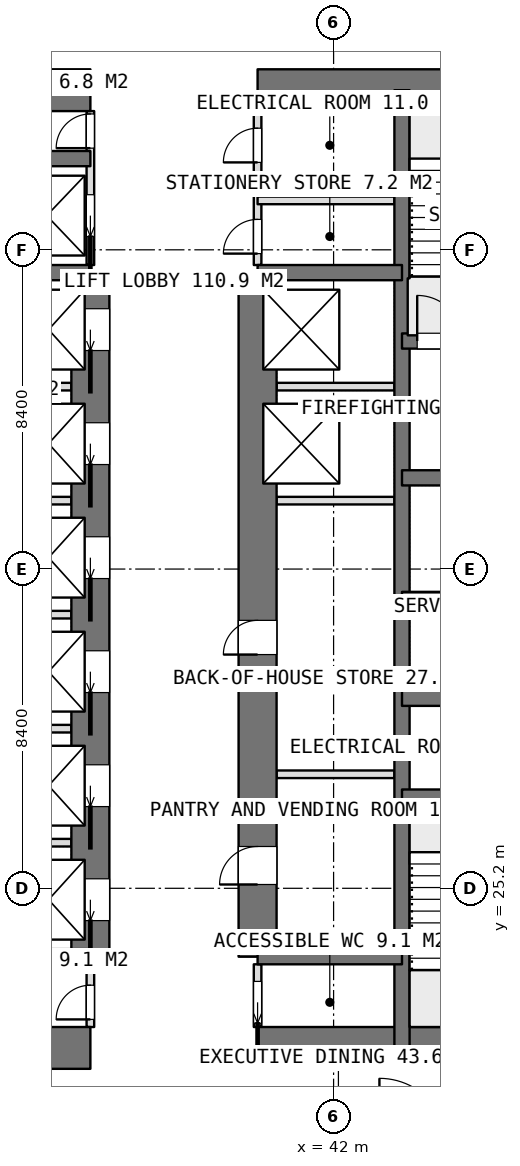
"""IFC4 building model, lengths in metres.
Left out: names, types, materials, properties, quantities, classifications, styles, units other than length and angle.
Written with IfcOpenShell. Run it as: python <this file> out.ifc"""

import sys

from ifc_helpers import new_model, si_unit, direction, frame, frame_2d, origin, place, context, subcontext, project, spatial, rectangle, extrude, element, fill, save


model = new_model("IFC4")
c1 = context("Model", 3, precision=1e-05, world=origin(), true_north=direction((0.0, 1.0)))
c2 = subcontext(c1, "Body", "Model", "MODEL_VIEW")
j1 = project(units=[si_unit("LENGTHUNIT", "METRE"), si_unit("PLANEANGLEUNIT", "RADIAN")], contexts=[c1])
p1 = place(None, origin())
s1 = spatial("IfcSite", under=j1, at=p1, CompositionType="ELEMENT")
p2 = place(p1, origin())
s2 = spatial("IfcBuilding", under=s1, at=p2, CompositionType="ELEMENT")
p3 = place(p2, frame((0.0, 0.0, 250.1)))
s3 = spatial("IfcBuildingStorey", under=s2, at=p3, CompositionType="ELEMENT", Elevation=250.1)
p4 = place(p3, frame((25.2, 21.0, 0.0), z_axis=(0.0, 0.0, 1.0), x_axis=(1.0, 0.0, 0.0)))
e1 = element("IfcWall", 1, at=p4, inside=s3, PredefinedType="SHEAR", context=c2, shape_type="SweptSolid", body=[
    extrude(rectangle(XDim=10.4, YDim=1.1, at=frame_2d((5.2, 0.0))), origin(), (0.0, 0.0, 1.0), 3.75),
])
p5 = place(p3, frame((40.0, 21.0, 0.0), z_axis=(0.0, 0.0, 1.0), x_axis=(1.0, 0.0, 0.0)))
e2 = element("IfcWall", 2, at=p5, inside=s3, PredefinedType="SHEAR", context=c2, shape_type="SweptSolid", body=[
    extrude(rectangle(XDim=10.4, YDim=1.1, at=frame_2d((5.2, 0.0))), origin(), (0.0, 0.0, 1.0), 3.75),
])
p6 = place(p3, frame((25.2, 46.2, 0.0), z_axis=(0.0, 0.0, 1.0), x_axis=(1.0, 0.0, 0.0)))
e3 = element("IfcWall", 3, at=p6, inside=s3, PredefinedType="SHEAR", context=c2, shape_type="SweptSolid", body=[
    extrude(rectangle(XDim=10.4, YDim=1.1, at=frame_2d((5.2, 0.0))), origin(), (0.0, 0.0, 1.0), 3.75),
])
p7 = place(p3, frame((40.0, 46.2, 0.0), z_axis=(0.0, 0.0, 1.0), x_axis=(1.0, 0.0, 0.0)))
e4 = element("IfcWall", 4, at=p7, inside=s3, PredefinedType="SHEAR", context=c2, shape_type="SweptSolid", body=[
    extrude(rectangle(XDim=10.4, YDim=1.1, at=frame_2d((5.2, 0.0))), origin(), (0.0, 0.0, 1.0), 3.75),
])
p8 = place(p3, frame((43.8, 21.0, 0.0), z_axis=(0.0, 0.0, 1.0), x_axis=(0.0, 1.0, 0.0)))
e5 = element("IfcWall", 5, at=p8, inside=s3, PredefinedType="SHEAR", context=c2, shape_type="SweptSolid", body=[
    extrude(rectangle(XDim=25.2, YDim=0.4, at=frame_2d((12.6, 0.0))), origin(), (0.0, 0.0, 1.0), 3.75),
])
p9 = place(p3, frame((35.6, 23.4, 0.0), z_axis=(0.0, 0.0, 1.0), x_axis=(0.0, 1.0, 0.0)))
e6 = element("IfcWall", 6, at=p9, inside=s3, PredefinedType="SHEAR", context=c2, shape_type="SweptSolid", body=[
    extrude(rectangle(XDim=18.0, YDim=1.0, at=frame_2d((9.0, 0.0))), origin(), (0.0, 0.0, 1.0), 3.75),
])
p10 = place(p9, frame((0.95, 0.0, 0.0)))
e7 = element("IfcOpeningElement", 7, at=p10, cuts=e6, PredefinedType="OPENING", context=c2, shape_type="SweptSolid", body=[
    extrude(rectangle(XDim=1.1, YDim=2.1, at=frame_2d((0.55, 1.05))), frame((0.0, 0.51, 0.0), z_axis=(0.0, -1.0, 0.0), x_axis=(1.0, 0.0, 0.0)), (0.0, 0.0, 1.0), 1.02),
])
p11 = place(p9, frame((3.95, 0.0, 0.0)))
e8 = element("IfcOpeningElement", 8, at=p11, cuts=e6, PredefinedType="OPENING", context=c2, shape_type="SweptSolid", body=[
    extrude(rectangle(XDim=1.1, YDim=2.1, at=frame_2d((0.55, 1.05))), frame((0.0, 0.51, 0.0), z_axis=(0.0, -1.0, 0.0), x_axis=(1.0, 0.0, 0.0)), (0.0, 0.0, 1.0), 1.02),
])
p12 = place(p9, frame((6.95, 0.0, 0.0)))
e9 = element("IfcOpeningElement", 9, at=p12, cuts=e6, PredefinedType="OPENING", context=c2, shape_type="SweptSolid", body=[
    extrude(rectangle(XDim=1.1, YDim=2.1, at=frame_2d((0.55, 1.05))), frame((0.0, 0.51, 0.0), z_axis=(0.0, -1.0, 0.0), x_axis=(1.0, 0.0, 0.0)), (0.0, 0.0, 1.0), 1.02),
])
p13 = place(p9, frame((9.95, 0.0, 0.0)))
e10 = element("IfcOpeningElement", 10, at=p13, cuts=e6, PredefinedType="OPENING", context=c2, shape_type="SweptSolid", body=[
    extrude(rectangle(XDim=1.1, YDim=2.1, at=frame_2d((0.55, 1.05))), frame((0.0, 0.51, 0.0), z_axis=(0.0, -1.0, 0.0), x_axis=(1.0, 0.0, 0.0)), (0.0, 0.0, 1.0), 1.02),
])
p14 = place(p9, frame((12.95, 0.0, 0.0)))
e11 = element("IfcOpeningElement", 11, at=p14, cuts=e6, PredefinedType="OPENING", context=c2, shape_type="SweptSolid", body=[
    extrude(rectangle(XDim=1.1, YDim=2.1, at=frame_2d((0.55, 1.05))), frame((0.0, 0.51, 0.0), z_axis=(0.0, -1.0, 0.0), x_axis=(1.0, 0.0, 0.0)), (0.0, 0.0, 1.0), 1.02),
])
p15 = place(p9, frame((15.95, 0.0, 0.0)))
e12 = element("IfcOpeningElement", 12, at=p15, cuts=e6, PredefinedType="OPENING", context=c2, shape_type="SweptSolid", body=[
    extrude(rectangle(XDim=1.1, YDim=2.1, at=frame_2d((0.55, 1.05))), frame((0.0, 0.51, 0.0), z_axis=(0.0, -1.0, 0.0), x_axis=(1.0, 0.0, 0.0)), (0.0, 0.0, 1.0), 1.02),
])
p16 = place(p3, frame((40.0, 23.4, 0.0), z_axis=(0.0, 0.0, 1.0), x_axis=(0.0, 1.0, 0.0)))
e13 = element("IfcWall", 13, at=p16, inside=s3, PredefinedType="SHEAR", context=c2, shape_type="SweptSolid", body=[
    extrude(rectangle(XDim=18.0, YDim=1.0, at=frame_2d((9.0, 0.0))), origin(), (0.0, 0.0, 1.0), 3.75),
])
p17 = place(p16, frame((1.9, 0.0, 0.0)))
e14 = element("IfcOpeningElement", 14, at=p17, cuts=e13, PredefinedType="OPENING", context=c2, shape_type="SweptSolid", body=[
    extrude(rectangle(XDim=1.0, YDim=2.1, at=frame_2d((0.5, 1.05))), frame((0.0, 0.51, 0.0), z_axis=(0.0, -1.0, 0.0), x_axis=(1.0, 0.0, 0.0)), (0.0, 0.0, 1.0), 1.02),
])
p18 = place(p16, frame((7.95, 0.0, 0.0)))
e15 = element("IfcOpeningElement", 15, at=p18, cuts=e13, PredefinedType="OPENING", context=c2, shape_type="SweptSolid", body=[
    extrude(rectangle(XDim=0.9, YDim=2.1, at=frame_2d((0.45, 1.05))), frame((0.0, 0.51, 0.0), z_axis=(0.0, -1.0, 0.0), x_axis=(1.0, 0.0, 0.0)), (0.0, 0.0, 1.0), 1.02),
])
for number, where, z_axis, x_axis in (
    (16, (31.8, 23.4, 0.0), (0.0, 0.0, 1.0), (1.0, 0.0, 0.0)),
    (17, (31.8, 41.4, 0.0), (0.0, 0.0, 1.0), (1.0, 0.0, 0.0)),
    (18, (31.8, 44.4, 0.0), (0.0, 0.0, 1.0), (1.0, 0.0, 0.0)),
    (19, (40.0, 23.4, 0.0), (0.0, 0.0, 1.0), (1.0, 0.0, 0.0)),
    (20, (40.0, 41.4, 0.0), (0.0, 0.0, 1.0), (1.0, 0.0, 0.0)),
):
    element("IfcWall", number, at=place(p3, frame(where, z_axis=z_axis, x_axis=x_axis)), inside=s3, PredefinedType="SHEAR", context=c2, shape_type="SweptSolid", body=[
        extrude(rectangle(XDim=3.8, YDim=0.4, at=frame_2d((1.9, 0.0))), origin(), (0.0, 0.0, 1.0), 3.75),
    ])
for number, where, z_axis, x_axis in (
    (21, (43.8, 27.6, 0.0), (0.0, 0.0, 1.0), (1.0, 0.0, 0.0)),
    (22, (43.8, 30.2, 0.0), (0.0, 0.0, 1.0), (1.0, 0.0, 0.0)),
    (23, (43.8, 32.8, 0.0), (0.0, 0.0, 1.0), (1.0, 0.0, 0.0)),
):
    element("IfcWall", number, at=place(p3, frame(where, z_axis=z_axis, x_axis=x_axis)), inside=s3, PredefinedType="SHEAR", context=c2, shape_type="SweptSolid", body=[
        extrude(rectangle(XDim=6.6, YDim=0.4, at=frame_2d((3.3, 0.0))), origin(), (0.0, 0.0, 1.0), 3.75),
    ])
p19 = place(p3, frame((43.8, 36.0, 0.0), z_axis=(0.0, 0.0, 1.0), x_axis=(1.0, 0.0, 0.0)))
e24 = element("IfcWall", 24, at=p19, inside=s3, PredefinedType="SHEAR", context=c2, shape_type="SweptSolid", body=[
    extrude(rectangle(XDim=6.6, YDim=0.4, at=frame_2d((3.3, 0.0))), origin(), (0.0, 0.0, 1.0), 3.75),
])
p20 = place(p19, frame((2.65, 0.0, 0.0)))
e25 = element("IfcOpeningElement", 25, at=p20, cuts=e24, PredefinedType="OPENING", context=c2, shape_type="SweptSolid", body=[
    extrude(rectangle(XDim=1.3, YDim=2.1, at=frame_2d((0.65, 1.05))), frame((0.0, 0.21, 0.0), z_axis=(0.0, -1.0, 0.0), x_axis=(1.0, 0.0, 0.0)), (0.0, 0.0, 1.0), 0.42),
])
p21 = place(p3, frame((43.8, 39.6, 0.0), z_axis=(0.0, 0.0, 1.0), x_axis=(1.0, 0.0, 0.0)))
e26 = element("IfcWall", 26, at=p21, inside=s3, PredefinedType="SHEAR", context=c2, shape_type="SweptSolid", body=[
    extrude(rectangle(XDim=6.6, YDim=0.4, at=frame_2d((3.3, 0.0))), origin(), (0.0, 0.0, 1.0), 3.75),
])
p22 = place(p21, frame((0.4, 0.0, 0.0)))
e27 = element("IfcOpeningElement", 27, at=p22, cuts=e26, PredefinedType="OPENING", context=c2, shape_type="SweptSolid", body=[
    extrude(rectangle(XDim=1.2, YDim=2.1, at=frame_2d((0.6, 1.05))), frame((0.0, 0.21, 0.0), z_axis=(0.0, -1.0, 0.0), x_axis=(1.0, 0.0, 0.0)), (0.0, 0.0, 1.0), 0.42),
])
for number, where, z_axis, x_axis in (
    (28, (32.0, 26.4, 0.0), (0.0, 0.0, 1.0), (1.0, 0.0, 0.0)),
    (29, (32.0, 29.4, 0.0), (0.0, 0.0, 1.0), (1.0, 0.0, 0.0)),
    (30, (32.0, 32.4, 0.0), (0.0, 0.0, 1.0), (1.0, 0.0, 0.0)),
    (31, (32.0, 35.4, 0.0), (0.0, 0.0, 1.0), (1.0, 0.0, 0.0)),
    (32, (32.0, 38.4, 0.0), (0.0, 0.0, 1.0), (1.0, 0.0, 0.0)),
    (33, (40.5, 35.4, 0.0), (0.0, 0.0, 1.0), (1.0, 0.0, 0.0)),
    (34, (40.5, 38.4, 0.0), (0.0, 0.0, 1.0), (1.0, 0.0, 0.0)),
):
    element("IfcWall", number, at=place(p3, frame(where, z_axis=z_axis, x_axis=x_axis)), inside=s3, PredefinedType="PARTITIONING", context=c2, shape_type="SweptSolid", body=[
        extrude(rectangle(XDim=3.1, YDim=0.2, at=frame_2d((1.55, 0.0))), origin(), (0.0, 0.0, 1.0), 3.5),
    ])
p23 = place(p3, frame((40.0, 21.55, 0.0), z_axis=(0.0, 0.0, 1.0), x_axis=(0.0, 1.0, 0.0)))
e35 = element("IfcWall", 35, at=p23, inside=s3, PredefinedType="PARTITIONING", context=c2, shape_type="SweptSolid", body=[
    extrude(rectangle(XDim=1.65, YDim=0.2, at=frame_2d((0.825, 0.0))), origin(), (0.0, 0.0, 1.0), 3.5),
])
p24 = place(p23, frame((0.1, 0.0, 0.0)))
e36 = element("IfcOpeningElement", 36, at=p24, cuts=e35, PredefinedType="OPENING", context=c2, shape_type="SweptSolid", body=[
    extrude(rectangle(XDim=1.1, YDim=2.1, at=frame_2d((0.55, 1.05))), frame((0.0, 0.11, 0.0), z_axis=(0.0, -1.0, 0.0), x_axis=(1.0, 0.0, 0.0)), (0.0, 0.0, 1.0), 0.22),
])
p25 = place(p3, frame((40.0, 41.6, 0.0), z_axis=(0.0, 0.0, 1.0), x_axis=(0.0, 1.0, 0.0)))
e37 = element("IfcWall", 37, at=p25, inside=s3, PredefinedType="PARTITIONING", context=c2, shape_type="SweptSolid", body=[
    extrude(rectangle(XDim=4.05, YDim=0.2, at=frame_2d((2.025, 0.0))), origin(), (0.0, 0.0, 1.0), 3.5),
])
p26 = place(p25, frame((2.7, 0.0, 0.0)))
e38 = element("IfcOpeningElement", 38, at=p26, cuts=e37, PredefinedType="OPENING", context=c2, shape_type="SweptSolid", body=[
    extrude(rectangle(XDim=0.9, YDim=2.1, at=frame_2d((0.45, 1.05))), frame((0.0, 0.11, 0.0), z_axis=(0.0, -1.0, 0.0), x_axis=(1.0, 0.0, 0.0)), (0.0, 0.0, 1.0), 0.22),
])
p27 = place(p25, frame((0.3, 0.0, 0.0)))
e39 = element("IfcOpeningElement", 39, at=p27, cuts=e37, PredefinedType="OPENING", context=c2, shape_type="SweptSolid", body=[
    extrude(rectangle(XDim=0.9, YDim=2.1, at=frame_2d((0.45, 1.05))), frame((0.0, 0.11, 0.0), z_axis=(0.0, -1.0, 0.0), x_axis=(1.0, 0.0, 0.0)), (0.0, 0.0, 1.0), 0.22),
])
p28 = place(p3, frame((35.6, 41.6, 0.0), z_axis=(0.0, 0.0, 1.0), x_axis=(0.0, 1.0, 0.0)))
e40 = element("IfcWall", 40, at=p28, inside=s3, PredefinedType="PARTITIONING", context=c2, shape_type="SweptSolid", body=[
    extrude(rectangle(XDim=4.05, YDim=0.2, at=frame_2d((2.025, 0.0))), origin(), (0.0, 0.0, 1.0), 3.5),
])
p29 = place(p28, frame((3.075, 0.0, 0.0)))
e41 = element("IfcOpeningElement", 41, at=p29, cuts=e40, PredefinedType="OPENING", context=c2, shape_type="SweptSolid", body=[
    extrude(rectangle(XDim=0.9, YDim=2.1, at=frame_2d((0.45, 1.05))), frame((0.0, 0.11, 0.0), z_axis=(0.0, -1.0, 0.0), x_axis=(1.0, 0.0, 0.0)), (0.0, 0.0, 1.0), 0.22),
])
p30 = place(p28, frame((0.75, 0.0, 0.0)))
e42 = element("IfcOpeningElement", 42, at=p30, cuts=e40, PredefinedType="OPENING", context=c2, shape_type="SweptSolid", body=[
    extrude(rectangle(XDim=1.1, YDim=2.1, at=frame_2d((0.55, 1.05))), frame((0.0, 0.11, 0.0), z_axis=(0.0, -1.0, 0.0), x_axis=(1.0, 0.0, 0.0)), (0.0, 0.0, 1.0), 0.22),
])
p31 = place(p3, frame((35.6, 21.55, 0.0), z_axis=(0.0, 0.0, 1.0), x_axis=(0.0, 1.0, 0.0)))
e43 = element("IfcWall", 43, at=p31, inside=s3, PredefinedType="PARTITIONING", context=c2, shape_type="SweptSolid", body=[
    extrude(rectangle(XDim=1.65, YDim=0.2, at=frame_2d((0.825, 0.0))), origin(), (0.0, 0.0, 1.0), 3.5),
])
p32 = place(p31, frame((0.2, 0.0, 0.0)))
e44 = element("IfcOpeningElement", 44, at=p32, cuts=e43, PredefinedType="OPENING", context=c2, shape_type="SweptSolid", body=[
    extrude(rectangle(XDim=0.9, YDim=2.1, at=frame_2d((0.45, 1.05))), frame((0.0, 0.11, 0.0), z_axis=(0.0, -1.0, 0.0), x_axis=(1.0, 0.0, 0.0)), (0.0, 0.0, 1.0), 0.22),
])
p33 = place(p3, frame((40.5, 28.2, 0.0), z_axis=(0.0, 0.0, 1.0), x_axis=(1.0, 0.0, 0.0)))
e45 = element("IfcWall", 45, at=p33, inside=s3, PredefinedType="PARTITIONING", context=c2, shape_type="SweptSolid", body=[
    extrude(rectangle(XDim=3.1, YDim=0.2, at=frame_2d((1.55, 0.0))), origin(), (0.0, 0.0, 1.0), 3.5),
])
p34 = place(p3, frame((40.0, 43.3, 0.0), z_axis=(0.0, 0.0, 1.0), x_axis=(1.0, 0.0, 0.0)))
e46 = element("IfcWall", 46, at=p34, inside=s3, PredefinedType="PARTITIONING", context=c2, shape_type="SweptSolid", body=[
    extrude(rectangle(XDim=3.6, YDim=0.2, at=frame_2d((1.8, 0.0))), origin(), (0.0, 0.0, 1.0), 3.5),
])
p35 = place(p24, origin())
e47 = element("IfcDoor", 47, at=p35, inside=s3, OperationType="SLIDING_TO_LEFT", PredefinedType="DOOR", context=c2, shape_type="SweptSolid", body=[
    extrude(rectangle(XDim=1.1, YDim=2.1, at=frame_2d((0.55, 1.05))), frame((0.0, 0.025, 0.0), z_axis=(0.0, -1.0, 0.0), x_axis=(1.0, 0.0, 0.0)), (0.0, 0.0, 1.0), 0.05),
])
fill(e36, e47)
p36 = place(p32, origin())
e48 = element("IfcDoor", 48, at=p36, inside=s3, OperationType="SINGLE_SWING_LEFT", PredefinedType="DOOR", context=c2, shape_type="SweptSolid", body=[
    extrude(rectangle(XDim=0.9, YDim=2.1, at=frame_2d((0.45, 1.05))), frame((0.0, 0.025, 0.0), z_axis=(0.0, -1.0, 0.0), x_axis=(1.0, 0.0, 0.0)), (0.0, 0.0, 1.0), 0.05),
])
fill(e44, e48)
p37 = place(p26, origin())
e49 = element("IfcDoor", 49, at=p37, inside=s3, OperationType="SINGLE_SWING_LEFT", PredefinedType="DOOR", context=c2, shape_type="SweptSolid", body=[
    extrude(rectangle(XDim=0.9, YDim=2.1, at=frame_2d((0.45, 1.05))), frame((0.0, 0.025, 0.0), z_axis=(0.0, -1.0, 0.0), x_axis=(1.0, 0.0, 0.0)), (0.0, 0.0, 1.0), 0.05),
])
fill(e38, e49)
p38 = place(p27, origin())
e50 = element("IfcDoor", 50, at=p38, inside=s3, OperationType="SINGLE_SWING_LEFT", PredefinedType="DOOR", context=c2, shape_type="SweptSolid", body=[
    extrude(rectangle(XDim=0.9, YDim=2.1, at=frame_2d((0.45, 1.05))), frame((0.0, 0.025, 0.0), z_axis=(0.0, -1.0, 0.0), x_axis=(1.0, 0.0, 0.0)), (0.0, 0.0, 1.0), 0.05),
])
fill(e39, e50)
p39 = place(p17, origin())
e51 = element("IfcDoor", 51, at=p39, inside=s3, OperationType="SINGLE_SWING_LEFT", PredefinedType="DOOR", context=c2, shape_type="SweptSolid", body=[
    extrude(rectangle(XDim=1.0, YDim=2.1, at=frame_2d((0.5, 1.05))), frame((0.0, 0.025, 0.0), z_axis=(0.0, -1.0, 0.0), x_axis=(1.0, 0.0, 0.0)), (0.0, 0.0, 1.0), 0.05),
])
fill(e14, e51)
p40 = place(p18, origin())
e52 = element("IfcDoor", 52, at=p40, inside=s3, OperationType="SINGLE_SWING_LEFT", PredefinedType="DOOR", context=c2, shape_type="SweptSolid", body=[
    extrude(rectangle(XDim=0.9, YDim=2.1, at=frame_2d((0.45, 1.05))), frame((0.0, 0.025, 0.0), z_axis=(0.0, -1.0, 0.0), x_axis=(1.0, 0.0, 0.0)), (0.0, 0.0, 1.0), 0.05),
])
fill(e15, e52)
p41 = place(p29, origin())
e53 = element("IfcDoor", 53, at=p41, inside=s3, OperationType="SINGLE_SWING_LEFT", PredefinedType="DOOR", context=c2, shape_type="SweptSolid", body=[
    extrude(rectangle(XDim=0.9, YDim=2.1, at=frame_2d((0.45, 1.05))), frame((0.0, 0.025, 0.0), z_axis=(0.0, -1.0, 0.0), x_axis=(1.0, 0.0, 0.0)), (0.0, 0.0, 1.0), 0.05),
])
fill(e41, e53)
p42 = place(p10, origin())
e54 = element("IfcDoor", 54, at=p42, inside=s3, OperationType="SLIDING_TO_LEFT", PredefinedType="USERDEFINED", context=c2, shape_type="SweptSolid", body=[
    extrude(rectangle(XDim=1.1, YDim=2.1, at=frame_2d((0.55, 1.05))), frame((0.0, 0.025, 0.0), z_axis=(0.0, -1.0, 0.0), x_axis=(1.0, 0.0, 0.0)), (0.0, 0.0, 1.0), 0.05),
])
fill(e7, e54)
p43 = place(p11, origin())
e55 = element("IfcDoor", 55, at=p43, inside=s3, OperationType="SLIDING_TO_LEFT", PredefinedType="USERDEFINED", context=c2, shape_type="SweptSolid", body=[
    extrude(rectangle(XDim=1.1, YDim=2.1, at=frame_2d((0.55, 1.05))), frame((0.0, 0.025, 0.0), z_axis=(0.0, -1.0, 0.0), x_axis=(1.0, 0.0, 0.0)), (0.0, 0.0, 1.0), 0.05),
])
fill(e8, e55)
p44 = place(p12, origin())
e56 = element("IfcDoor", 56, at=p44, inside=s3, OperationType="SLIDING_TO_LEFT", PredefinedType="USERDEFINED", context=c2, shape_type="SweptSolid", body=[
    extrude(rectangle(XDim=1.1, YDim=2.1, at=frame_2d((0.55, 1.05))), frame((0.0, 0.025, 0.0), z_axis=(0.0, -1.0, 0.0), x_axis=(1.0, 0.0, 0.0)), (0.0, 0.0, 1.0), 0.05),
])
fill(e9, e56)
p45 = place(p13, origin())
e57 = element("IfcDoor", 57, at=p45, inside=s3, OperationType="SLIDING_TO_LEFT", PredefinedType="USERDEFINED", context=c2, shape_type="SweptSolid", body=[
    extrude(rectangle(XDim=1.1, YDim=2.1, at=frame_2d((0.55, 1.05))), frame((0.0, 0.025, 0.0), z_axis=(0.0, -1.0, 0.0), x_axis=(1.0, 0.0, 0.0)), (0.0, 0.0, 1.0), 0.05),
])
fill(e10, e57)
p46 = place(p14, origin())
e58 = element("IfcDoor", 58, at=p46, inside=s3, OperationType="SLIDING_TO_LEFT", PredefinedType="USERDEFINED", context=c2, shape_type="SweptSolid", body=[
    extrude(rectangle(XDim=1.1, YDim=2.1, at=frame_2d((0.55, 1.05))), frame((0.0, 0.025, 0.0), z_axis=(0.0, -1.0, 0.0), x_axis=(1.0, 0.0, 0.0)), (0.0, 0.0, 1.0), 0.05),
])
fill(e11, e58)
p47 = place(p15, origin())
e59 = element("IfcDoor", 59, at=p47, inside=s3, OperationType="SLIDING_TO_LEFT", PredefinedType="USERDEFINED", context=c2, shape_type="SweptSolid", body=[
    extrude(rectangle(XDim=1.1, YDim=2.1, at=frame_2d((0.55, 1.05))), frame((0.0, 0.025, 0.0), z_axis=(0.0, -1.0, 0.0), x_axis=(1.0, 0.0, 0.0)), (0.0, 0.0, 1.0), 0.05),
])
fill(e12, e59)
p48 = place(p30, origin())
e60 = element("IfcDoor", 60, at=p48, inside=s3, OperationType="SLIDING_TO_LEFT", PredefinedType="USERDEFINED", context=c2, shape_type="SweptSolid", body=[
    extrude(rectangle(XDim=1.1, YDim=2.1, at=frame_2d((0.55, 1.05))), frame((0.0, 0.025, 0.0), z_axis=(0.0, -1.0, 0.0), x_axis=(1.0, 0.0, 0.0)), (0.0, 0.0, 1.0), 0.05),
])
fill(e42, e60)
p49 = place(p22, origin())
e61 = element("IfcDoor", 61, at=p49, inside=s3, OperationType="SINGLE_SWING_RIGHT", PredefinedType="DOOR", context=c2, shape_type="SweptSolid", body=[
    extrude(rectangle(XDim=1.2, YDim=2.1, at=frame_2d((0.6, 1.05))), frame((0.0, 0.025, 0.0), z_axis=(0.0, -1.0, 0.0), x_axis=(1.0, 0.0, 0.0)), (0.0, 0.0, 1.0), 0.05),
])
fill(e27, e61)
save(model, sys.argv[1])
